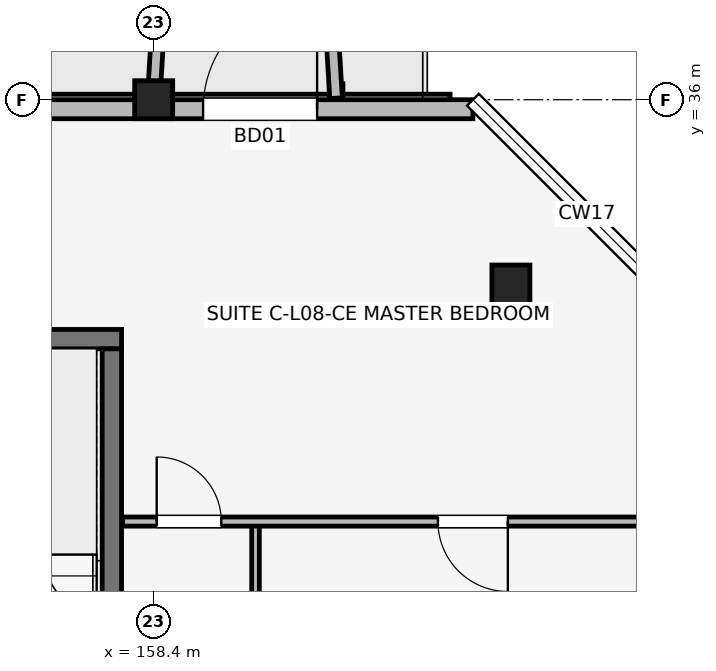
"""IFC4 building model, lengths in metres.
Left out: names, types, materials, properties, quantities, classifications, styles, units other than length and angle.
Written with IfcOpenShell. Run it as: python <this file> out.ifc"""

import sys

from ifc_helpers import new_model, si_unit, direction, frame, frame_2d, origin, origin_2d, place, context, subcontext, project, spatial, rectangle, extrude, element, fill, save


model = new_model("IFC4")
c1 = context("Model", 3, precision=1e-05, world=origin(), true_north=direction((0.0, 1.0)))
c2 = subcontext(c1, "Body", "Model", "MODEL_VIEW")
j1 = project(units=[si_unit("LENGTHUNIT", "METRE"), si_unit("PLANEANGLEUNIT", "RADIAN")], contexts=[c1])
p1 = place(None, origin())
s1 = spatial("IfcSite", under=j1, at=p1, CompositionType="ELEMENT")
p2 = place(p1, origin())
s2 = spatial("IfcBuilding", under=s1, at=p2, CompositionType="ELEMENT")
p3 = place(p2, frame((0.0, 0.0, 27.6)))
s3 = spatial("IfcBuildingStorey", under=s2, at=p3, CompositionType="ELEMENT", Elevation=27.6)
p4 = place(p3, frame((158.4, 36.0, 0.0), z_axis=(0.0, 0.0, 1.0), x_axis=(1.0, 0.0, 0.0)))
e1 = element("IfcColumn", 1, at=p4, inside=s3, PredefinedType="COLUMN", context=c2, shape_type="SweptSolid", body=[
    extrude(rectangle(XDim=0.5, YDim=0.5, at=origin_2d()), origin(), (0.0, 0.0, 1.0), 3.15),
])
p5 = place(p3, frame((163.1, 33.5, 0.0), z_axis=(0.0, 0.0, 1.0), x_axis=(1.0, 0.0, 0.0)))
e2 = element("IfcColumn", 2, at=p5, inside=s3, PredefinedType="COLUMN", context=c2, shape_type="SweptSolid", body=[
    extrude(rectangle(XDim=0.5, YDim=0.65, at=origin_2d()), origin(), (0.0, 0.0, 1.0), 3.15),
])
p6 = place(p3, frame((154.673, 32.85, 0.0), z_axis=(0.0, 0.0, 1.0), x_axis=(1.0, 0.0, 0.0)))
e3 = element("IfcWall", 3, at=p6, inside=s3, PredefinedType="SHEAR", context=c2, shape_type="SweptSolid", body=[
    extrude(rectangle(XDim=3.305, YDim=0.255, at=frame_2d((1.652, 0.0))), origin(), (0.0, 0.0, 1.0), 3.15),
])
p7 = place(p3, frame((157.85, 26.427, 0.0), z_axis=(0.0, 0.0, 1.0), x_axis=(0.0, 1.0, 0.0)))
e4 = element("IfcWall", 4, at=p7, inside=s3, PredefinedType="SHEAR", context=c2, shape_type="SweptSolid", body=[
    extrude(rectangle(XDim=6.295, YDim=0.255, at=frame_2d((3.147, 0.0))), origin(), (0.0, 0.0, 1.0), 3.15),
])
p8 = place(p3, frame((162.6, 35.875, 0.0), z_axis=(0.0, 0.0, 1.0), x_axis=(-1.0, 0.0, 0.0)))
e5 = element("IfcWall", 5, at=p8, inside=s3, PredefinedType="SOLIDWALL", context=c2, shape_type="SweptSolid", body=[
    extrude(rectangle(XDim=30.0, YDim=0.25, at=frame_2d((15.0, 0.0))), origin(), (0.0, 0.0, 1.0), 2.43),
])
p9 = place(p8, frame((27.95, 0.0, 0.0), z_axis=(0.0, 0.0, 1.0), x_axis=(-1.0, 0.0, 0.0)))
e6 = element("IfcOpeningElement", 6, at=p9, cuts=e5, PredefinedType="OPENING", context=c2, shape_type="SweptSolid", body=[
    extrude(rectangle(XDim=1.5, YDim=2.15, at=frame_2d((0.75, 1.075))), frame((0.0, 0.135, 0.0), z_axis=(0.0, -1.0, 0.0), x_axis=(1.0, 0.0, 0.0)), (0.0, 0.0, 1.0), 0.27),
])
p10 = place(p8, frame((3.55, 0.0, 0.0), z_axis=(0.0, 0.0, 1.0), x_axis=(-1.0, 0.0, 0.0)))
e7 = element("IfcOpeningElement", 7, at=p10, cuts=e5, PredefinedType="OPENING", context=c2, shape_type="SweptSolid", body=[
    extrude(rectangle(XDim=1.5, YDim=2.15, at=frame_2d((0.75, 1.075))), frame((0.0, 0.135, 0.0), z_axis=(0.0, -1.0, 0.0), x_axis=(1.0, 0.0, 0.0)), (0.0, 0.0, 1.0), 0.27),
])
p11 = place(p8, frame((14.425, 0.0, 0.5)))
e8 = element("IfcOpeningElement", 8, at=p11, cuts=e5, PredefinedType="OPENING", context=c2, shape_type="SweptSolid", body=[
    extrude(rectangle(XDim=1.15, YDim=1.68, at=frame_2d((0.575, 0.84))), frame((0.0, 0.135, 0.0), z_axis=(0.0, -1.0, 0.0), x_axis=(1.0, 0.0, 0.0)), (0.0, 0.0, 1.0), 0.27),
])
p12 = place(p8, frame((9.125, 0.0, 0.7)))
e9 = element("IfcOpeningElement", 9, at=p12, cuts=e5, PredefinedType="OPENING", context=c2, shape_type="SweptSolid", body=[
    extrude(rectangle(XDim=1.86, YDim=1.6, at=frame_2d((0.93, 0.8))), frame((0.0, 0.135, 0.0), z_axis=(0.0, -1.0, 0.0), x_axis=(1.0, 0.0, 0.0)), (0.0, 0.0, 1.0), 0.27),
])
p13 = place(p8, frame((19.015, 0.0, 0.7)))
e10 = element("IfcOpeningElement", 10, at=p13, cuts=e5, PredefinedType="OPENING", context=c2, shape_type="SweptSolid", body=[
    extrude(rectangle(XDim=1.86, YDim=1.6, at=frame_2d((0.93, 0.8))), frame((0.0, 0.135, 0.0), z_axis=(0.0, -1.0, 0.0), x_axis=(1.0, 0.0, 0.0)), (0.0, 0.0, 1.0), 0.27),
])
for number, where, z_axis, x_axis in (
    (11, (158.4, 36.02, 0.0), (0.0, 0.0, 1.0), (0.061, 0.998, 0.0)),
    (12, (160.8, 36.02, 0.0), (0.0, 0.0, 1.0), (-0.061, 0.998, 0.0)),
):
    element("IfcWall", number, at=place(p3, frame(where, z_axis=z_axis, x_axis=x_axis)), inside=s3, PredefinedType="ELEMENTEDWALL", context=c2, shape_type="SweptSolid", body=[
        extrude(rectangle(XDim=1.964, YDim=0.165, at=frame_2d((0.982, 0.0))), origin(), (0.0, 0.0, 1.0), 2.95),
    ])
p14 = place(p3, frame((159.74, 26.1, 0.0), z_axis=(0.0, 0.0, 1.0), x_axis=(0.0, 1.0, 0.0)))
e13 = element("IfcWall", 13, at=p14, inside=s3, PredefinedType="PARTITIONING", context=c2, shape_type="SweptSolid", body=[
    extrude(rectangle(XDim=4.35, YDim=0.1, at=frame_2d((2.175, 0.0))), origin(), (0.0, 0.0, 1.0), 2.38),
])
p15 = place(p3, frame((157.99, 30.45, 0.0), z_axis=(0.0, 0.0, 1.0), x_axis=(1.0, 0.0, 0.0)))
e14 = element("IfcWall", 14, at=p15, inside=s3, PredefinedType="PARTITIONING", context=c2, shape_type="SweptSolid", body=[
    extrude(rectangle(XDim=7.47, YDim=0.12, at=frame_2d((3.735, 0.0))), origin(), (0.0, 0.0, 1.0), 2.38),
])
p16 = place(p15, frame((0.45, 0.0, 0.0)))
e15 = element("IfcOpeningElement", 15, at=p16, cuts=e14, PredefinedType="OPENING", context=c2, shape_type="SweptSolid", body=[
    extrude(rectangle(XDim=0.85, YDim=2.08, at=frame_2d((0.425, 1.04))), frame((0.0, 0.07, 0.0), z_axis=(0.0, -1.0, 0.0), x_axis=(1.0, 0.0, 0.0)), (0.0, 0.0, 1.0), 0.14),
])
p17 = place(p15, frame((5.07, 0.0, 0.0), z_axis=(0.0, 0.0, 1.0), x_axis=(-1.0, 0.0, 0.0)))
e16 = element("IfcOpeningElement", 16, at=p17, cuts=e14, PredefinedType="OPENING", context=c2, shape_type="SweptSolid", body=[
    extrude(rectangle(XDim=0.92, YDim=2.08, at=frame_2d((0.46, 1.04))), frame((0.0, 0.07, 0.0), z_axis=(0.0, -1.0, 0.0), x_axis=(1.0, 0.0, 0.0)), (0.0, 0.0, 1.0), 0.14),
])
p18 = place(p10, origin())
e17 = element("IfcDoor", 17, at=p18, inside=s3, OperationType="SINGLE_SWING_LEFT", PredefinedType="DOOR", context=c2, shape_type="SweptSolid", body=[
    extrude(rectangle(XDim=1.5, YDim=2.15, at=frame_2d((0.75, 1.075))), frame((0.0, 0.025, 0.0), z_axis=(0.0, -1.0, 0.0), x_axis=(1.0, 0.0, 0.0)), (0.0, 0.0, 1.0), 0.05),
])
fill(e7, e17)
p19 = place(p16, origin())
e18 = element("IfcDoor", 18, at=p19, inside=s3, OperationType="SINGLE_SWING_LEFT", PredefinedType="DOOR", context=c2, shape_type="SweptSolid", body=[
    extrude(rectangle(XDim=0.85, YDim=2.08, at=frame_2d((0.425, 1.04))), frame((0.0, 0.025, 0.0), z_axis=(0.0, -1.0, 0.0), x_axis=(1.0, 0.0, 0.0)), (0.0, 0.0, 1.0), 0.05),
])
fill(e15, e18)
p20 = place(p17, origin())
e19 = element("IfcDoor", 19, at=p20, inside=s3, OperationType="SINGLE_SWING_RIGHT", PredefinedType="DOOR", context=c2, shape_type="SweptSolid", body=[
    extrude(rectangle(XDim=0.92, YDim=2.08, at=frame_2d((0.46, 1.04))), frame((0.0, 0.025, 0.0), z_axis=(0.0, -1.0, 0.0), x_axis=(1.0, 0.0, 0.0)), (0.0, 0.0, 1.0), 0.05),
])
fill(e16, e19)
save(model, sys.argv[1])
